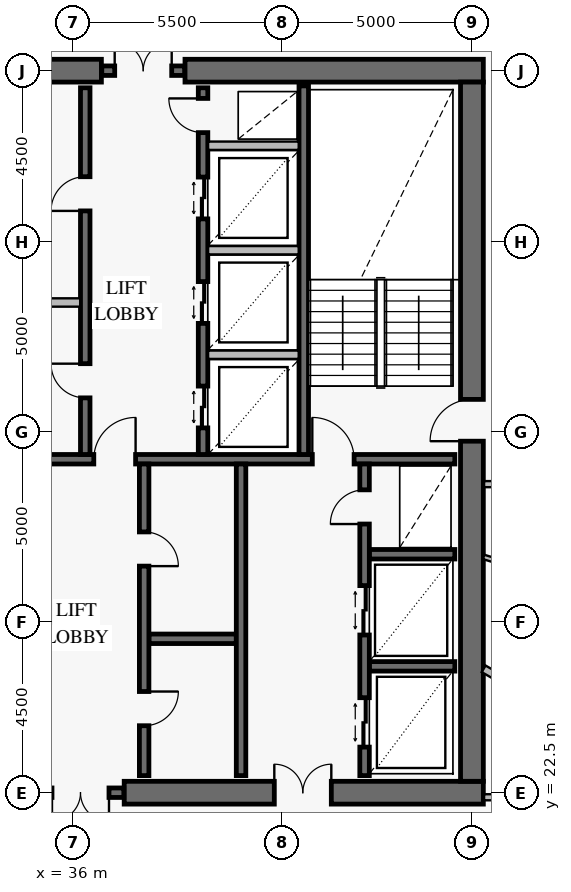
"""IFC4 building model, lengths in metres.
Left out: names, types, materials, properties, quantities, classifications, styles, units other than length and angle.
Written with IfcOpenShell. Run it as: python <this file> out.ifc"""

import sys

from ifc_helpers import new_model, si_unit, direction, frame, frame_2d, origin, place, context, subcontext, project, spatial, rectangle, extrude, element, fill, save


model = new_model("IFC4")
c1 = context("Model", 3, precision=1e-05, world=origin(), true_north=direction((0.0, 1.0)))
c2 = subcontext(c1, "Body", "Model", "MODEL_VIEW")
j1 = project(units=[si_unit("LENGTHUNIT", "METRE"), si_unit("PLANEANGLEUNIT", "RADIAN")], contexts=[c1])
p1 = place(None, origin())
s1 = spatial("IfcSite", under=j1, at=p1, CompositionType="ELEMENT")
p2 = place(p1, origin())
s2 = spatial("IfcBuilding", under=s1, at=p2, CompositionType="ELEMENT")
p3 = place(p2, frame((0.0, 0.0, 242.6)))
s3 = spatial("IfcBuildingStorey", under=s2, at=p3, CompositionType="ELEMENT", Elevation=242.6)
p4 = place(p3, frame((37.35, 22.5, 0.0), z_axis=(0.0, 0.0, 1.0), x_axis=(1.0, 0.0, 0.0)))
e1 = element("IfcWall", 1, at=p4, inside=s3, PredefinedType="SHEAR", context=c2, shape_type="SweptSolid", body=[
    extrude(rectangle(XDim=9.45, YDim=0.6, at=frame_2d((4.725, 0.0))), origin(), (0.0, 0.0, 1.0), 3.8),
])
p5 = place(p4, frame((3.95, 0.0, 0.0)))
e2 = element("IfcOpeningElement", 2, at=p5, cuts=e1, PredefinedType="OPENING", context=c2, shape_type="SweptSolid", body=[
    extrude(rectangle(XDim=1.5, YDim=2.15, at=frame_2d((0.75, 1.075))), frame((0.0, 0.312, 0.0), z_axis=(0.0, -1.0, 0.0), x_axis=(1.0, 0.0, 0.0)), (0.0, 0.0, 1.0), 0.624),
])
p6 = place(p3, frame((46.8, 41.5, 0.0), z_axis=(0.0, 0.0, 1.0), x_axis=(-1.0, 0.0, 0.0)))
e3 = element("IfcWall", 3, at=p6, inside=s3, PredefinedType="SHEAR", context=c2, shape_type="SweptSolid", body=[
    extrude(rectangle(XDim=7.85, YDim=0.6, at=frame_2d((3.925, 0.0))), origin(), (0.0, 0.0, 1.0), 3.8),
])
p7 = place(p3, frame((36.75, 41.5, 0.0), z_axis=(0.0, 0.0, 1.0), x_axis=(-1.0, 0.0, 0.0)))
e4 = element("IfcWall", 4, at=p7, inside=s3, PredefinedType="SHEAR", context=c2, shape_type="SweptSolid", body=[
    extrude(rectangle(XDim=11.55, YDim=0.6, at=frame_2d((5.775, 0.0))), origin(), (0.0, 0.0, 1.0), 3.8),
])
p8 = place(p7, frame((4.25, 0.0, 0.0)))
e5 = element("IfcOpeningElement", 5, at=p8, cuts=e4, PredefinedType="OPENING", context=c2, shape_type="SweptSolid", body=[
    extrude(rectangle(XDim=1.1, YDim=2.15, at=frame_2d((0.55, 1.075))), frame((0.0, 0.312, 0.0), z_axis=(0.0, -1.0, 0.0), x_axis=(1.0, 0.0, 0.0)), (0.0, 0.0, 1.0), 0.624),
])
p9 = place(p3, frame((46.5, 22.8, 0.0), z_axis=(0.0, 0.0, 1.0), x_axis=(0.0, 1.0, 0.0)))
e6 = element("IfcWall", 6, at=p9, inside=s3, PredefinedType="SHEAR", context=c2, shape_type="SweptSolid", body=[
    extrude(rectangle(XDim=18.4, YDim=0.6, at=frame_2d((9.2, 0.0))), origin(), (0.0, 0.0, 1.0), 3.8),
])
p10 = place(p9, frame((8.95, 0.0, 0.0)))
e7 = element("IfcOpeningElement", 7, at=p10, cuts=e6, PredefinedType="OPENING", context=c2, shape_type="SweptSolid", body=[
    extrude(rectangle(XDim=1.1, YDim=2.15, at=frame_2d((0.55, 1.075))), frame((0.0, 0.312, 0.0), z_axis=(0.0, -1.0, 0.0), x_axis=(1.0, 0.0, 0.0)), (0.0, 0.0, 1.0), 0.624),
])
p11 = place(p3, frame((35.06, 22.5, 0.0), z_axis=(0.0, 0.0, 1.0), x_axis=(1.0, 0.0, 0.0)))
e8 = element("IfcWall", 8, at=p11, inside=s3, PredefinedType="SOLIDWALL", context=c2, shape_type="SweptSolid", body=[
    extrude(rectangle(XDim=2.28, YDim=0.25, at=frame_2d((1.14, 0.0))), origin(), (0.0, 0.0, 1.0), 3.8),
])
p12 = place(p11, frame((0.39, 0.0, 0.0)))
e9 = element("IfcOpeningElement", 9, at=p12, cuts=e8, PredefinedType="OPENING", context=c2, shape_type="SweptSolid", body=[
    extrude(rectangle(XDim=1.5, YDim=2.15, at=frame_2d((0.75, 1.075))), frame((0.0, 0.137, 0.0), z_axis=(0.0, -1.0, 0.0), x_axis=(1.0, 0.0, 0.0)), (0.0, 0.0, 1.0), 0.274),
])
p13 = place(p3, frame((36.76, 41.5, 0.0), z_axis=(0.0, 0.0, 1.0), x_axis=(1.0, 0.0, 0.0)))
e10 = element("IfcWall", 10, at=p13, inside=s3, PredefinedType="SOLIDWALL", context=c2, shape_type="SweptSolid", body=[
    extrude(rectangle(XDim=2.18, YDim=0.25, at=frame_2d((1.09, 0.0))), origin(), (0.0, 0.0, 1.0), 3.8),
])
p14 = place(p13, frame((0.34, 0.0, 0.0)))
e11 = element("IfcOpeningElement", 11, at=p14, cuts=e10, PredefinedType="OPENING", context=c2, shape_type="SweptSolid", body=[
    extrude(rectangle(XDim=1.5, YDim=2.15, at=frame_2d((0.75, 1.075))), frame((0.0, 0.137, 0.0), z_axis=(0.0, -1.0, 0.0), x_axis=(1.0, 0.0, 0.0)), (0.0, 0.0, 1.0), 0.274),
])
p15 = place(p3, frame((25.95, 31.275, 0.0), z_axis=(0.0, 0.0, 1.0), x_axis=(1.0, 0.0, 0.0)))
e12 = element("IfcWall", 12, at=p15, inside=s3, PredefinedType="SOLIDWALL", context=c2, shape_type="SweptSolid", body=[
    extrude(rectangle(XDim=20.1, YDim=0.25, at=frame_2d((10.05, 0.0))), origin(), (0.0, 0.0, 1.0), 3.8),
])
p16 = place(p15, frame((2.6, 0.0, 0.0)))
e13 = element("IfcOpeningElement", 13, at=p16, cuts=e12, PredefinedType="OPENING", context=c2, shape_type="SweptSolid", body=[
    extrude(rectangle(XDim=1.1, YDim=2.15, at=frame_2d((0.55, 1.075))), frame((0.0, 0.137, 0.0), z_axis=(0.0, -1.0, 0.0), x_axis=(1.0, 0.0, 0.0)), (0.0, 0.0, 1.0), 0.274),
])
p17 = place(p15, frame((10.6, 0.0, 0.0)))
e14 = element("IfcOpeningElement", 14, at=p17, cuts=e12, PredefinedType="OPENING", context=c2, shape_type="SweptSolid", body=[
    extrude(rectangle(XDim=1.1, YDim=2.15, at=frame_2d((0.55, 1.075))), frame((0.0, 0.137, 0.0), z_axis=(0.0, -1.0, 0.0), x_axis=(1.0, 0.0, 0.0)), (0.0, 0.0, 1.0), 0.274),
])
p18 = place(p15, frame((16.35, 0.0, 0.0)))
e15 = element("IfcOpeningElement", 15, at=p18, cuts=e12, PredefinedType="OPENING", context=c2, shape_type="SweptSolid", body=[
    extrude(rectangle(XDim=1.1, YDim=2.15, at=frame_2d((0.55, 1.075))), frame((0.0, 0.137, 0.0), z_axis=(0.0, -1.0, 0.0), x_axis=(1.0, 0.0, 0.0)), (0.0, 0.0, 1.0), 0.274),
])
p19 = place(p3, frame((42.075, 31.4, 0.0), z_axis=(0.0, 0.0, 1.0), x_axis=(0.0, 1.0, 0.0)))
e16 = element("IfcWall", 16, at=p19, inside=s3, PredefinedType="SOLIDWALL", context=c2, shape_type="SweptSolid", body=[
    extrude(rectangle(XDim=9.7, YDim=0.25, at=frame_2d((4.85, 0.0))), origin(), (0.0, 0.0, 1.0), 3.8),
])
p20 = place(p3, frame((36.325, 31.4, 0.0), z_axis=(0.0, 0.0, 1.0), x_axis=(0.0, 1.0, 0.0)))
e17 = element("IfcWall", 17, at=p20, inside=s3, PredefinedType="SOLIDWALL", context=c2, shape_type="SweptSolid", body=[
    extrude(rectangle(XDim=9.65, YDim=0.25, at=frame_2d((4.825, 0.0))), origin(), (0.0, 0.0, 1.0), 3.8),
])
p21 = place(p20, frame((1.49, 0.0, 0.0)))
e18 = element("IfcOpeningElement", 18, at=p21, cuts=e17, PredefinedType="OPENING", context=c2, shape_type="SweptSolid", body=[
    extrude(rectangle(XDim=0.9, YDim=2.1, at=frame_2d((0.45, 1.05))), frame((0.0, 0.137, 0.0), z_axis=(0.0, -1.0, 0.0), x_axis=(1.0, 0.0, 0.0)), (0.0, 0.0, 1.0), 0.274),
])
p22 = place(p20, frame((6.41, 0.0, 0.0)))
e19 = element("IfcOpeningElement", 19, at=p22, cuts=e17, PredefinedType="OPENING", context=c2, shape_type="SweptSolid", body=[
    extrude(rectangle(XDim=0.9, YDim=2.1, at=frame_2d((0.45, 1.05))), frame((0.0, 0.137, 0.0), z_axis=(0.0, -1.0, 0.0), x_axis=(1.0, 0.0, 0.0)), (0.0, 0.0, 1.0), 0.274),
])
p23 = place(p3, frame((39.425, 31.4, 0.0), z_axis=(0.0, 0.0, 1.0), x_axis=(0.0, 1.0, 0.0)))
e20 = element("IfcWall", 20, at=p23, inside=s3, PredefinedType="SOLIDWALL", context=c2, shape_type="SweptSolid", body=[
    extrude(rectangle(XDim=9.65, YDim=0.25, at=frame_2d((4.825, 0.0))), origin(), (0.0, 0.0, 1.0), 3.8),
])
p24 = place(p23, frame((0.7, 0.0, 0.0)))
e21 = element("IfcOpeningElement", 21, at=p24, cuts=e20, PredefinedType="OPENING", context=c2, shape_type="SweptSolid", body=[
    extrude(rectangle(XDim=1.1, YDim=2.2, at=frame_2d((0.55, 1.1))), frame((0.0, 0.137, 0.0), z_axis=(0.0, -1.0, 0.0), x_axis=(1.0, 0.0, 0.0)), (0.0, 0.0, 1.0), 0.274),
])
p25 = place(p23, frame((3.45, 0.0, 0.0)))
e22 = element("IfcOpeningElement", 22, at=p25, cuts=e20, PredefinedType="OPENING", context=c2, shape_type="SweptSolid", body=[
    extrude(rectangle(XDim=1.1, YDim=2.2, at=frame_2d((0.55, 1.1))), frame((0.0, 0.137, 0.0), z_axis=(0.0, -1.0, 0.0), x_axis=(1.0, 0.0, 0.0)), (0.0, 0.0, 1.0), 0.274),
])
p26 = place(p23, frame((6.2, 0.0, 0.0)))
e23 = element("IfcOpeningElement", 23, at=p26, cuts=e20, PredefinedType="OPENING", context=c2, shape_type="SweptSolid", body=[
    extrude(rectangle(XDim=1.1, YDim=2.2, at=frame_2d((0.55, 1.1))), frame((0.0, 0.137, 0.0), z_axis=(0.0, -1.0, 0.0), x_axis=(1.0, 0.0, 0.0)), (0.0, 0.0, 1.0), 0.274),
])
p27 = place(p23, frame((8.47, 0.0, 0.0)))
e24 = element("IfcOpeningElement", 24, at=p27, cuts=e20, PredefinedType="OPENING", context=c2, shape_type="SweptSolid", body=[
    extrude(rectangle(XDim=0.9, YDim=2.1, at=frame_2d((0.45, 1.05))), frame((0.0, 0.137, 0.0), z_axis=(0.0, -1.0, 0.0), x_axis=(1.0, 0.0, 0.0)), (0.0, 0.0, 1.0), 0.274),
])
p28 = place(p3, frame((38.0, 26.55, 0.0), z_axis=(0.0, 0.0, 1.0), x_axis=(1.0, 0.0, 0.0)))
e25 = element("IfcWall", 25, at=p28, inside=s3, PredefinedType="SOLIDWALL", context=c2, shape_type="SweptSolid", body=[
    extrude(rectangle(XDim=2.3, YDim=0.25, at=frame_2d((1.15, 0.0))), origin(), (0.0, 0.0, 1.0), 3.8),
])
p29 = place(p3, frame((37.875, 22.95, 0.0), z_axis=(0.0, 0.0, 1.0), x_axis=(0.0, 1.0, 0.0)))
e26 = element("IfcWall", 26, at=p29, inside=s3, PredefinedType="SOLIDWALL", context=c2, shape_type="SweptSolid", body=[
    extrude(rectangle(XDim=8.2, YDim=0.25, at=frame_2d((4.1, 0.0))), origin(), (0.0, 0.0, 1.0), 3.8),
])
p30 = place(p29, frame((1.312, 0.0, 0.0)))
e27 = element("IfcOpeningElement", 27, at=p30, cuts=e26, PredefinedType="OPENING", context=c2, shape_type="SweptSolid", body=[
    extrude(rectangle(XDim=0.9, YDim=2.1, at=frame_2d((0.45, 1.05))), frame((0.0, 0.137, 0.0), z_axis=(0.0, -1.0, 0.0), x_axis=(1.0, 0.0, 0.0)), (0.0, 0.0, 1.0), 0.274),
])
p31 = place(p29, frame((5.512, 0.0, 0.0)))
e28 = element("IfcOpeningElement", 28, at=p31, cuts=e26, PredefinedType="OPENING", context=c2, shape_type="SweptSolid", body=[
    extrude(rectangle(XDim=0.9, YDim=2.1, at=frame_2d((0.45, 1.05))), frame((0.0, 0.137, 0.0), z_axis=(0.0, -1.0, 0.0), x_axis=(1.0, 0.0, 0.0)), (0.0, 0.0, 1.0), 0.274),
])
p32 = place(p3, frame((40.425, 22.95, 0.0), z_axis=(0.0, 0.0, 1.0), x_axis=(0.0, 1.0, 0.0)))
e29 = element("IfcWall", 29, at=p32, inside=s3, PredefinedType="SOLIDWALL", context=c2, shape_type="SweptSolid", body=[
    extrude(rectangle(XDim=8.2, YDim=0.25, at=frame_2d((4.1, 0.0))), origin(), (0.0, 0.0, 1.0), 3.8),
])
for number, where, z_axis, x_axis in (
    (30, (43.8, 25.825, 0.0), (0.0, 0.0, 1.0), (1.0, 0.0, 0.0)),
    (31, (43.8, 28.775, 0.0), (0.0, 0.0, 1.0), (1.0, 0.0, 0.0)),
):
    element("IfcWall", number, at=place(p3, frame(where, z_axis=z_axis, x_axis=x_axis)), inside=s3, PredefinedType="SOLIDWALL", context=c2, shape_type="SweptSolid", body=[
        extrude(rectangle(XDim=2.25, YDim=0.25, at=frame_2d((1.125, 0.0))), origin(), (0.0, 0.0, 1.0), 3.8),
    ])
p33 = place(p3, frame((43.675, 22.95, 0.0), z_axis=(0.0, 0.0, 1.0), x_axis=(0.0, 1.0, 0.0)))
e32 = element("IfcWall", 32, at=p33, inside=s3, PredefinedType="SOLIDWALL", context=c2, shape_type="SweptSolid", body=[
    extrude(rectangle(XDim=8.2, YDim=0.25, at=frame_2d((4.1, 0.0))), origin(), (0.0, 0.0, 1.0), 3.8),
])
p34 = place(p33, frame((0.75, 0.0, 0.0)))
e33 = element("IfcOpeningElement", 33, at=p34, cuts=e32, PredefinedType="OPENING", context=c2, shape_type="SweptSolid", body=[
    extrude(rectangle(XDim=1.3, YDim=2.3, at=frame_2d((0.65, 1.15))), frame((0.0, 0.137, 0.0), z_axis=(0.0, -1.0, 0.0), x_axis=(1.0, 0.0, 0.0)), (0.0, 0.0, 1.0), 0.274),
])
p35 = place(p33, frame((3.7, 0.0, 0.0)))
e34 = element("IfcOpeningElement", 34, at=p35, cuts=e32, PredefinedType="OPENING", context=c2, shape_type="SweptSolid", body=[
    extrude(rectangle(XDim=1.3, YDim=2.3, at=frame_2d((0.65, 1.15))), frame((0.0, 0.137, 0.0), z_axis=(0.0, -1.0, 0.0), x_axis=(1.0, 0.0, 0.0)), (0.0, 0.0, 1.0), 0.274),
])
p36 = place(p33, frame((6.62, 0.0, 0.0)))
e35 = element("IfcOpeningElement", 35, at=p36, cuts=e32, PredefinedType="OPENING", context=c2, shape_type="SweptSolid", body=[
    extrude(rectangle(XDim=0.9, YDim=2.1, at=frame_2d((0.45, 1.05))), frame((0.0, 0.137, 0.0), z_axis=(0.0, -1.0, 0.0), x_axis=(1.0, 0.0, 0.0)), (0.0, 0.0, 1.0), 0.274),
])
p37 = place(p3, frame((46.808, 28.704, 0.0), z_axis=(0.0, 0.0, 1.0), x_axis=(0.956504815911, -0.291716535594, 0.0)))
e36 = element("IfcWall", 36, at=p37, inside=s3, PredefinedType="PARTITIONING", context=c2, shape_type="SweptSolid", body=[
    extrude(rectangle(XDim=3.781, YDim=0.12, at=frame_2d((1.891, 0.0))), origin(), (0.0, 0.0, 1.0), 3.55),
])
p38 = place(p37, frame((1.119, 0.0, 0.0)))
e37 = element("IfcOpeningElement", 37, at=p38, cuts=e36, PredefinedType="OPENING", context=c2, shape_type="SweptSolid", body=[
    extrude(rectangle(XDim=0.9, YDim=2.1, at=frame_2d((0.45, 1.05))), frame((0.0, 0.072, 0.0), z_axis=(0.0, -1.0, 0.0), x_axis=(1.0, 0.0, 0.0)), (0.0, 0.0, 1.0), 0.144),
])
p39 = place(p3, frame((46.82, 30.62, 0.0), z_axis=(0.0, 0.0, 1.0), x_axis=(1.0, 0.0, 0.0)))
e38 = element("IfcWall", 38, at=p39, inside=s3, PredefinedType="PARTITIONING", context=c2, shape_type="SweptSolid", body=[
    extrude(rectangle(XDim=2.03, YDim=0.16, at=frame_2d((1.015, 0.0))), origin(), (0.0, 0.0, 1.0), 3.55),
])
p40 = place(p39, frame((0.49, 0.0, 0.0)))
e39 = element("IfcOpeningElement", 39, at=p40, cuts=e38, PredefinedType="OPENING", context=c2, shape_type="SweptSolid", body=[
    extrude(rectangle(XDim=1.05, YDim=2.15, at=frame_2d((0.525, 1.075))), frame((0.0, 0.092, 0.0), z_axis=(0.0, -1.0, 0.0), x_axis=(1.0, 0.0, 0.0)), (0.0, 0.0, 1.0), 0.184),
])
p41 = place(p3, frame((34.108, 35.4, 0.0), z_axis=(0.0, 0.0, 1.0), x_axis=(1.0, 0.0, 0.0)))
e40 = element("IfcWall", 40, at=p41, inside=s3, PredefinedType="PARTITIONING", context=c2, shape_type="SweptSolid", body=[
    extrude(rectangle(XDim=2.084, YDim=0.22, at=frame_2d((1.042, 0.0))), origin(), (0.0, 0.0, 1.0), 3.55),
])
for number, where, z_axis, x_axis in (
    (41, (39.558, 34.025, 0.0), (0.0, 0.0, 1.0), (1.0, 0.0, 0.0)),
    (42, (39.558, 36.775, 0.0), (0.0, 0.0, 1.0), (1.0, 0.0, 0.0)),
    (43, (39.558, 39.525, 0.0), (0.0, 0.0, 1.0), (1.0, 0.0, 0.0)),
):
    element("IfcWall", number, at=place(p3, frame(where, z_axis=z_axis, x_axis=x_axis)), inside=s3, PredefinedType="PARTITIONING", context=c2, shape_type="SweptSolid", body=[
        extrude(rectangle(XDim=2.384, YDim=0.22, at=frame_2d((1.192, 0.0))), origin(), (0.0, 0.0, 1.0), 3.55),
    ])
p42 = place(p3, frame((46.808, 25.76, 0.0), z_axis=(0.0, 0.0, 1.0), x_axis=(0.86602399778, -0.500002435262, 0.0)))
e44 = element("IfcWall", 44, at=p42, inside=s3, PredefinedType="PARTITIONING", context=c2, shape_type="SweptSolid", body=[
    extrude(rectangle(XDim=13.083, YDim=0.2, at=frame_2d((6.542, 0.0))), origin(), (0.0, 0.0, 1.0), 2.93),
])
p43 = place(p3, frame((48.85, 22.38, 0.0), z_axis=(0.0, 0.0, 1.0), x_axis=(-1.0, 0.0, 0.0)))
e45 = element("IfcWall", 45, at=p43, inside=s3, PredefinedType="PARTITIONING", context=c2, shape_type="SweptSolid", body=[
    extrude(rectangle(XDim=2.03, YDim=0.16, at=frame_2d((1.015, 0.0))), origin(), (0.0, 0.0, 1.0), 3.55),
])
p44 = place(p10, origin())
e46 = element("IfcDoor", 46, at=p44, inside=s3, OperationType="SINGLE_SWING_LEFT", PredefinedType="USERDEFINED", context=c2, shape_type="SweptSolid", body=[
    extrude(rectangle(XDim=1.1, YDim=2.15, at=frame_2d((0.55, 1.075))), frame((0.0, 0.025, 0.0), z_axis=(0.0, -1.0, 0.0), x_axis=(1.0, 0.0, 0.0)), (0.0, 0.0, 1.0), 0.05),
])
fill(e7, e46)
p45 = place(p5, origin())
e47 = element("IfcDoor", 47, at=p45, inside=s3, OperationType="DOUBLE_DOOR_SINGLE_SWING", PredefinedType="DOOR", context=c2, shape_type="SweptSolid", body=[
    extrude(rectangle(XDim=1.5, YDim=2.15, at=frame_2d((0.75, 1.075))), frame((0.0, 0.025, 0.0), z_axis=(0.0, -1.0, 0.0), x_axis=(1.0, 0.0, 0.0)), (0.0, 0.0, 1.0), 0.05),
])
fill(e2, e47)
p46 = place(p12, frame((1.5, 0.0, 0.0), z_axis=(0.0, 0.0, 1.0), x_axis=(-1.0, 0.0, 0.0)))
e48 = element("IfcDoor", 48, at=p46, inside=s3, OperationType="DOUBLE_DOOR_SINGLE_SWING", PredefinedType="DOOR", context=c2, shape_type="SweptSolid", body=[
    extrude(rectangle(XDim=1.5, YDim=2.15, at=frame_2d((0.75, 1.075))), frame((0.0, 0.025, 0.0), z_axis=(0.0, -1.0, 0.0), x_axis=(1.0, 0.0, 0.0)), (0.0, 0.0, 1.0), 0.05),
])
fill(e9, e48)
p47 = place(p14, origin())
e49 = element("IfcDoor", 49, at=p47, inside=s3, OperationType="DOUBLE_DOOR_SINGLE_SWING", PredefinedType="DOOR", context=c2, shape_type="SweptSolid", body=[
    extrude(rectangle(XDim=1.5, YDim=2.15, at=frame_2d((0.75, 1.075))), frame((0.0, 0.025, 0.0), z_axis=(0.0, -1.0, 0.0), x_axis=(1.0, 0.0, 0.0)), (0.0, 0.0, 1.0), 0.05),
])
fill(e11, e49)
p48 = place(p17, origin())
e50 = element("IfcDoor", 50, at=p48, inside=s3, OperationType="SINGLE_SWING_RIGHT", PredefinedType="USERDEFINED", context=c2, shape_type="SweptSolid", body=[
    extrude(rectangle(XDim=1.1, YDim=2.15, at=frame_2d((0.55, 1.075))), frame((0.0, 0.025, 0.0), z_axis=(0.0, -1.0, 0.0), x_axis=(1.0, 0.0, 0.0)), (0.0, 0.0, 1.0), 0.05),
])
fill(e14, e50)
p49 = place(p18, origin())
e51 = element("IfcDoor", 51, at=p49, inside=s3, OperationType="SINGLE_SWING_LEFT", PredefinedType="USERDEFINED", context=c2, shape_type="SweptSolid", body=[
    extrude(rectangle(XDim=1.1, YDim=2.15, at=frame_2d((0.55, 1.075))), frame((0.0, 0.025, 0.0), z_axis=(0.0, -1.0, 0.0), x_axis=(1.0, 0.0, 0.0)), (0.0, 0.0, 1.0), 0.05),
])
fill(e15, e51)
p50 = place(p21, origin())
e52 = element("IfcDoor", 52, at=p50, inside=s3, OperationType="SINGLE_SWING_RIGHT", PredefinedType="DOOR", context=c2, shape_type="SweptSolid", body=[
    extrude(rectangle(XDim=0.9, YDim=2.1, at=frame_2d((0.45, 1.05))), frame((0.0, 0.025, 0.0), z_axis=(0.0, -1.0, 0.0), x_axis=(1.0, 0.0, 0.0)), (0.0, 0.0, 1.0), 0.05),
])
fill(e18, e52)
p51 = place(p22, origin())
e53 = element("IfcDoor", 53, at=p51, inside=s3, OperationType="SINGLE_SWING_LEFT", PredefinedType="DOOR", context=c2, shape_type="SweptSolid", body=[
    extrude(rectangle(XDim=0.9, YDim=2.1, at=frame_2d((0.45, 1.05))), frame((0.0, 0.025, 0.0), z_axis=(0.0, -1.0, 0.0), x_axis=(1.0, 0.0, 0.0)), (0.0, 0.0, 1.0), 0.05),
])
fill(e19, e53)
p52 = place(p24, origin())
e54 = element("IfcDoor", 54, at=p52, inside=s3, OperationType="DOUBLE_DOOR_SLIDING", PredefinedType="DOOR", context=c2, shape_type="SweptSolid", body=[
    extrude(rectangle(XDim=1.1, YDim=2.2, at=frame_2d((0.55, 1.1))), frame((0.0, 0.025, 0.0), z_axis=(0.0, -1.0, 0.0), x_axis=(1.0, 0.0, 0.0)), (0.0, 0.0, 1.0), 0.05),
])
fill(e21, e54)
p53 = place(p25, origin())
e55 = element("IfcDoor", 55, at=p53, inside=s3, OperationType="DOUBLE_DOOR_SLIDING", PredefinedType="DOOR", context=c2, shape_type="SweptSolid", body=[
    extrude(rectangle(XDim=1.1, YDim=2.2, at=frame_2d((0.55, 1.1))), frame((0.0, 0.025, 0.0), z_axis=(0.0, -1.0, 0.0), x_axis=(1.0, 0.0, 0.0)), (0.0, 0.0, 1.0), 0.05),
])
fill(e22, e55)
p54 = place(p26, origin())
e56 = element("IfcDoor", 56, at=p54, inside=s3, OperationType="DOUBLE_DOOR_SLIDING", PredefinedType="DOOR", context=c2, shape_type="SweptSolid", body=[
    extrude(rectangle(XDim=1.1, YDim=2.2, at=frame_2d((0.55, 1.1))), frame((0.0, 0.025, 0.0), z_axis=(0.0, -1.0, 0.0), x_axis=(1.0, 0.0, 0.0)), (0.0, 0.0, 1.0), 0.05),
])
fill(e23, e56)
p55 = place(p27, origin())
e57 = element("IfcDoor", 57, at=p55, inside=s3, OperationType="SINGLE_SWING_RIGHT", PredefinedType="DOOR", context=c2, shape_type="SweptSolid", body=[
    extrude(rectangle(XDim=0.9, YDim=2.1, at=frame_2d((0.45, 1.05))), frame((0.0, 0.025, 0.0), z_axis=(0.0, -1.0, 0.0), x_axis=(1.0, 0.0, 0.0)), (0.0, 0.0, 1.0), 0.05),
])
fill(e24, e57)
p56 = place(p30, frame((0.9, 0.0, 0.0), z_axis=(0.0, 0.0, 1.0), x_axis=(-1.0, 0.0, 0.0)))
e58 = element("IfcDoor", 58, at=p56, inside=s3, OperationType="SINGLE_SWING_LEFT", PredefinedType="DOOR", context=c2, shape_type="SweptSolid", body=[
    extrude(rectangle(XDim=0.9, YDim=2.1, at=frame_2d((0.45, 1.05))), frame((0.0, 0.025, 0.0), z_axis=(0.0, -1.0, 0.0), x_axis=(1.0, 0.0, 0.0)), (0.0, 0.0, 1.0), 0.05),
])
fill(e27, e58)
p57 = place(p31, frame((0.9, 0.0, 0.0), z_axis=(0.0, 0.0, 1.0), x_axis=(-1.0, 0.0, 0.0)))
e59 = element("IfcDoor", 59, at=p57, inside=s3, OperationType="SINGLE_SWING_RIGHT", PredefinedType="DOOR", context=c2, shape_type="SweptSolid", body=[
    extrude(rectangle(XDim=0.9, YDim=2.1, at=frame_2d((0.45, 1.05))), frame((0.0, 0.025, 0.0), z_axis=(0.0, -1.0, 0.0), x_axis=(1.0, 0.0, 0.0)), (0.0, 0.0, 1.0), 0.05),
])
fill(e28, e59)
p58 = place(p34, origin())
e60 = element("IfcDoor", 60, at=p58, inside=s3, OperationType="DOUBLE_DOOR_SLIDING", PredefinedType="DOOR", context=c2, shape_type="SweptSolid", body=[
    extrude(rectangle(XDim=1.3, YDim=2.3, at=frame_2d((0.65, 1.15))), frame((0.0, 0.025, 0.0), z_axis=(0.0, -1.0, 0.0), x_axis=(1.0, 0.0, 0.0)), (0.0, 0.0, 1.0), 0.05),
])
fill(e33, e60)
p59 = place(p35, origin())
e61 = element("IfcDoor", 61, at=p59, inside=s3, OperationType="DOUBLE_DOOR_SLIDING", PredefinedType="DOOR", context=c2, shape_type="SweptSolid", body=[
    extrude(rectangle(XDim=1.3, YDim=2.3, at=frame_2d((0.65, 1.15))), frame((0.0, 0.025, 0.0), z_axis=(0.0, -1.0, 0.0), x_axis=(1.0, 0.0, 0.0)), (0.0, 0.0, 1.0), 0.05),
])
fill(e34, e61)
p60 = place(p36, origin())
e62 = element("IfcDoor", 62, at=p60, inside=s3, OperationType="SINGLE_SWING_LEFT", PredefinedType="DOOR", context=c2, shape_type="SweptSolid", body=[
    extrude(rectangle(XDim=0.9, YDim=2.1, at=frame_2d((0.45, 1.05))), frame((0.0, 0.025, 0.0), z_axis=(0.0, -1.0, 0.0), x_axis=(1.0, 0.0, 0.0)), (0.0, 0.0, 1.0), 0.05),
])
fill(e35, e62)
save(model, sys.argv[1])
